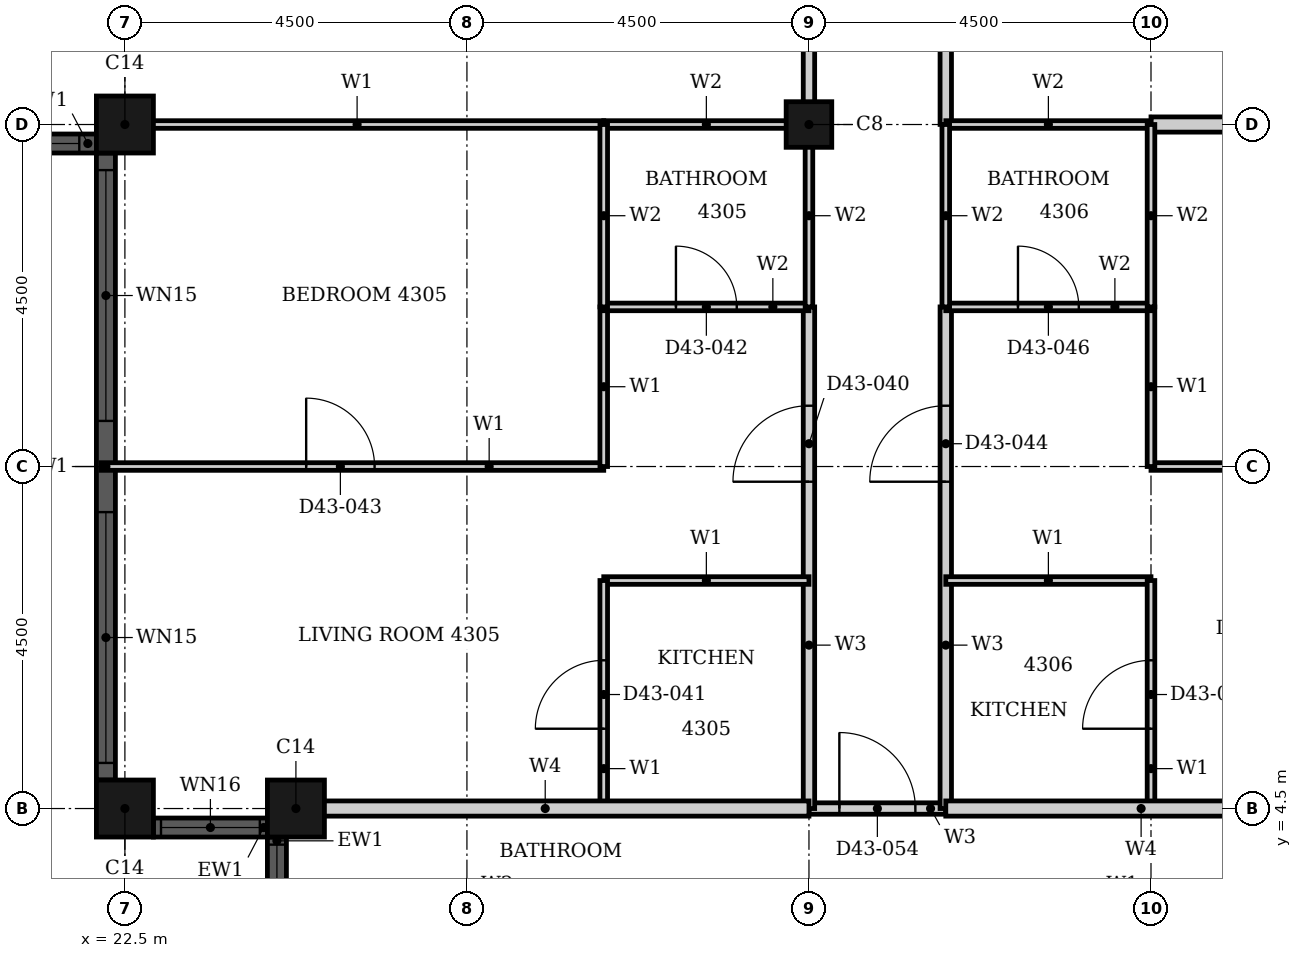
"""IFC4 building model, lengths in metres.
Left out: names, types, materials, properties, quantities, classifications, styles, units other than length and angle.
Written with IfcOpenShell. Run it as: python <this file> out.ifc"""

import sys

from ifc_helpers import new_model, si_unit, direction, frame, frame_2d, origin, origin_2d, place, context, subcontext, project, spatial, rectangle, hollow_rectangle, extrude, element, fill, save


model = new_model("IFC4")
c1 = context("Model", 3, precision=1e-05, world=origin(), true_north=direction((0.0, 1.0)))
c2 = subcontext(c1, "Body", "Model", "MODEL_VIEW")
j1 = project(units=[si_unit("LENGTHUNIT", "METRE"), si_unit("PLANEANGLEUNIT", "RADIAN")], contexts=[c1])
p1 = place(None, origin())
s1 = spatial("IfcSite", under=j1, at=p1, CompositionType="ELEMENT")
p2 = place(p1, origin())
s2 = spatial("IfcBuilding", under=s1, at=p2, CompositionType="ELEMENT")
p3 = place(p2, frame((0.0, 0.0, 172.8)))
s3 = spatial("IfcBuildingStorey", under=s2, at=p3, CompositionType="ELEMENT", Elevation=172.8)
for number, where, z_axis, x_axis in (
    (1, (22.5, 4.5, 0.0), (0.0, 0.0, 1.0), (1.0, 0.0, 0.0)),
    (2, (24.75, 4.5, 0.0), (0.0, 0.0, 1.0), (1.0, 0.0, 0.0)),
    (3, (22.5, 13.5, 0.0), (0.0, 0.0, 1.0), (1.0, 0.0, 0.0)),
):
    element("IfcColumn", number, at=place(p3, frame(where, z_axis=z_axis, x_axis=x_axis)), inside=s3, PredefinedType="COLUMN", context=c2, shape_type="SweptSolid", body=[
        extrude(hollow_rectangle(XDim=0.75, YDim=0.75, WallThickness=0.024, at=origin_2d()), origin(), (0.0, 0.0, 1.0), 3.7),
    ])
p4 = place(p3, frame((31.5, 13.5, 0.0), z_axis=(0.0, 0.0, 1.0), x_axis=(1.0, 0.0, 0.0)))
e4 = element("IfcColumn", 4, at=p4, inside=s3, PredefinedType="COLUMN", context=c2, shape_type="SweptSolid", body=[
    extrude(hollow_rectangle(XDim=0.6, YDim=0.6, WallThickness=0.02, at=origin_2d()), origin(), (0.0, 0.0, 1.0), 3.7),
])
p5 = place(p3, frame((22.875, 4.25, 0.0), z_axis=(0.0, 0.0, 1.0), x_axis=(1.0, 0.0, 0.0)))
e5 = element("IfcWall", 5, at=p5, inside=s3, PredefinedType="SOLIDWALL", context=c2, shape_type="SweptSolid", body=[
    extrude(rectangle(XDim=1.5, YDim=0.25, at=frame_2d((0.75, 0.0))), origin(), (0.0, 0.0, 1.0), 3.7),
])
p6 = place(p5, frame((0.1, 0.0, 0.9)))
e6 = element("IfcOpeningElement", 6, at=p6, cuts=e5, PredefinedType="OPENING", context=c2, shape_type="SweptSolid", body=[
    extrude(rectangle(XDim=1.3, YDim=1.85, at=frame_2d((0.65, 0.925))), frame((0.0, 0.135, 0.0), z_axis=(0.0, -1.0, 0.0), x_axis=(1.0, 0.0, 0.0)), (0.0, 0.0, 1.0), 0.27),
])
p7 = place(p3, frame((24.5, 4.125, 0.0), z_axis=(0.0, 0.0, 1.0), x_axis=(0.0, -1.0, 0.0)))
e7 = element("IfcWall", 7, at=p7, inside=s3, PredefinedType="SOLIDWALL", context=c2, shape_type="SweptSolid", body=[
    extrude(rectangle(XDim=1.5, YDim=0.25, at=frame_2d((0.75, 0.0))), origin(), (0.0, 0.0, 1.0), 3.7),
])
p8 = place(p7, frame((0.1, 0.0, 0.9)))
e8 = element("IfcOpeningElement", 8, at=p8, cuts=e7, PredefinedType="OPENING", context=c2, shape_type="SweptSolid", body=[
    extrude(rectangle(XDim=1.3, YDim=1.85, at=frame_2d((0.65, 0.925))), frame((0.0, 0.135, 0.0), z_axis=(0.0, -1.0, 0.0), x_axis=(1.0, 0.0, 0.0)), (0.0, 0.0, 1.0), 0.27),
])
p9 = place(p3, frame((18.375, 13.25, 0.0), z_axis=(0.0, 0.0, 1.0), x_axis=(1.0, 0.0, 0.0)))
e9 = element("IfcWall", 9, at=p9, inside=s3, PredefinedType="SOLIDWALL", context=c2, shape_type="SweptSolid", body=[
    extrude(rectangle(XDim=3.75, YDim=0.25, at=frame_2d((1.875, 0.0))), origin(), (0.0, 0.0, 1.0), 3.7),
])
p10 = place(p9, frame((0.225, 0.0, 0.45)))
e10 = element("IfcOpeningElement", 10, at=p10, cuts=e9, PredefinedType="OPENING", context=c2, shape_type="SweptSolid", body=[
    extrude(rectangle(XDim=3.3, YDim=2.3, at=frame_2d((1.65, 1.15))), frame((0.0, 0.135, 0.0), z_axis=(0.0, -1.0, 0.0), x_axis=(1.0, 0.0, 0.0)), (0.0, 0.0, 1.0), 0.27),
])
p11 = place(p3, frame((22.25, 13.125, 0.0), z_axis=(0.0, 0.0, 1.0), x_axis=(0.0, -1.0, 0.0)))
e11 = element("IfcWall", 11, at=p11, inside=s3, PredefinedType="SOLIDWALL", context=c2, shape_type="SweptSolid", body=[
    extrude(rectangle(XDim=8.25, YDim=0.25, at=frame_2d((4.125, 0.0))), origin(), (0.0, 0.0, 1.0), 3.7),
])
p12 = place(p11, frame((0.225, 0.0, 0.45)))
e12 = element("IfcOpeningElement", 12, at=p12, cuts=e11, PredefinedType="OPENING", context=c2, shape_type="SweptSolid", body=[
    extrude(rectangle(XDim=3.3, YDim=2.3, at=frame_2d((1.65, 1.15))), frame((0.0, 0.135, 0.0), z_axis=(0.0, -1.0, 0.0), x_axis=(1.0, 0.0, 0.0)), (0.0, 0.0, 1.0), 0.27),
])
p13 = place(p11, frame((4.725, 0.0, 0.45)))
e13 = element("IfcOpeningElement", 13, at=p13, cuts=e11, PredefinedType="OPENING", context=c2, shape_type="SweptSolid", body=[
    extrude(rectangle(XDim=3.3, YDim=2.3, at=frame_2d((1.65, 1.15))), frame((0.0, 0.135, 0.0), z_axis=(0.0, -1.0, 0.0), x_axis=(1.0, 0.0, 0.0)), (0.0, 0.0, 1.0), 0.27),
])
p14 = place(p3, frame((31.5, 4.5, 0.0), z_axis=(0.0, 0.0, 1.0), x_axis=(1.0, 0.0, 0.0)))
e14 = element("IfcWall", 14, at=p14, inside=s3, PredefinedType="PARTITIONING", context=c2, shape_type="SweptSolid", body=[
    extrude(rectangle(XDim=1.8, YDim=0.15, at=frame_2d((0.9, 0.0))), origin(), (0.0, 0.0, 1.0), 3.4),
])
p15 = place(p14, frame((0.4, 0.0, 0.0)))
e15 = element("IfcOpeningElement", 15, at=p15, cuts=e14, PredefinedType="OPENING", context=c2, shape_type="SweptSolid", body=[
    extrude(rectangle(XDim=1.0, YDim=2.2, at=frame_2d((0.5, 1.1))), frame((0.0, 0.085, 0.0), z_axis=(0.0, -1.0, 0.0), x_axis=(1.0, 0.0, 0.0)), (0.0, 0.0, 1.0), 0.17),
])
p16 = place(p3, frame((31.5, 4.5, 0.0), z_axis=(0.0, 0.0, 1.0), x_axis=(0.0, 1.0, 0.0)))
e16 = element("IfcWall", 16, at=p16, inside=s3, PredefinedType="PARTITIONING", context=c2, shape_type="SweptSolid", body=[
    extrude(rectangle(XDim=6.6, YDim=0.15, at=frame_2d((3.3, 0.0))), origin(), (0.0, 0.0, 1.0), 2.68),
])
p17 = place(p16, frame((4.3, 0.0, 0.0)))
e17 = element("IfcOpeningElement", 17, at=p17, cuts=e16, PredefinedType="OPENING", context=c2, shape_type="SweptSolid", body=[
    extrude(rectangle(XDim=1.0, YDim=2.2, at=frame_2d((0.5, 1.1))), frame((0.0, 0.085, 0.0), z_axis=(0.0, -1.0, 0.0), x_axis=(1.0, 0.0, 0.0)), (0.0, 0.0, 1.0), 0.17),
])
p18 = place(p3, frame((31.5, 13.5, 0.0), z_axis=(0.0, 0.0, 1.0), x_axis=(0.0, 1.0, 0.0)))
e18 = element("IfcWall", 18, at=p18, inside=s3, PredefinedType="PARTITIONING", context=c2, shape_type="SweptSolid", body=[
    extrude(rectangle(XDim=7.2, YDim=0.15, at=frame_2d((3.6, 0.0))), origin(), (0.0, 0.0, 1.0), 3.4),
])
p19 = place(p3, frame((33.3, 4.5, 0.0), z_axis=(0.0, 0.0, 1.0), x_axis=(0.0, 1.0, 0.0)))
e19 = element("IfcWall", 19, at=p19, inside=s3, PredefinedType="PARTITIONING", context=c2, shape_type="SweptSolid", body=[
    extrude(rectangle(XDim=6.6, YDim=0.15, at=frame_2d((3.3, 0.0))), origin(), (0.0, 0.0, 1.0), 3.4),
])
p20 = place(p19, frame((4.3, 0.0, 0.0)))
e20 = element("IfcOpeningElement", 20, at=p20, cuts=e19, PredefinedType="OPENING", context=c2, shape_type="SweptSolid", body=[
    extrude(rectangle(XDim=1.0, YDim=2.2, at=frame_2d((0.5, 1.1))), frame((0.0, 0.085, 0.0), z_axis=(0.0, -1.0, 0.0), x_axis=(1.0, 0.0, 0.0)), (0.0, 0.0, 1.0), 0.17),
])
p21 = place(p3, frame((33.3, 13.501, 0.0), z_axis=(0.0, 0.0, 1.0), x_axis=(0.0, 1.0, 0.0)))
e21 = element("IfcWall", 21, at=p21, inside=s3, PredefinedType="PARTITIONING", context=c2, shape_type="SweptSolid", body=[
    extrude(rectangle(XDim=7.198, YDim=0.15, at=frame_2d((3.599, 0.0))), origin(), (0.0, 0.0, 1.0), 3.4),
])
p22 = place(p21, frame((3.099, 0.0, 0.0)))
e22 = element("IfcOpeningElement", 22, at=p22, cuts=e21, PredefinedType="OPENING", context=c2, shape_type="SweptSolid", body=[
    extrude(rectangle(XDim=1.0, YDim=2.2, at=frame_2d((0.5, 1.1))), frame((0.0, 0.085, 0.0), z_axis=(0.0, -1.0, 0.0), x_axis=(1.0, 0.0, 0.0)), (0.0, 0.0, 1.0), 0.17),
])
p23 = place(p3, frame((22.31, 13.5, 0.0), z_axis=(0.0, 0.0, 1.0), x_axis=(1.0, 0.0, 0.0)))
e23 = element("IfcWall", 23, at=p23, inside=s3, PredefinedType="PARTITIONING", context=c2, shape_type="SweptSolid", body=[
    extrude(rectangle(XDim=6.49, YDim=0.1, at=frame_2d((3.245, 0.0))), origin(), (0.0, 0.0, 1.0), 2.48),
])
for number, where, z_axis, x_axis in (
    (24, (33.3, 7.5, 0.0), (0.0, 0.0, 1.0), (1.0, 0.0, 0.0)),
    (25, (28.8, 7.5, 0.0), (0.0, 0.0, 1.0), (1.0, 0.0, 0.0)),
):
    element("IfcWall", number, at=place(p3, frame(where, z_axis=z_axis, x_axis=x_axis)), inside=s3, PredefinedType="PARTITIONING", context=c2, shape_type="SweptSolid", body=[
        extrude(rectangle(XDim=2.7, YDim=0.1, at=frame_2d((1.35, 0.0))), origin(), (0.0, 0.0, 1.0), 3.4),
    ])
p24 = place(p3, frame((36.0, 9.0, 0.0), z_axis=(0.0, 0.0, 1.0), x_axis=(1.0, 0.0, 0.0)))
e26 = element("IfcWall", 26, at=p24, inside=s3, PredefinedType="PARTITIONING", context=c2, shape_type="SweptSolid", body=[
    extrude(rectangle(XDim=4.815, YDim=0.1, at=frame_2d((2.407, 0.0))), origin(), (0.0, 0.0, 1.0), 3.4),
])
p25 = place(p24, frame((1.8, 0.0, 0.0)))
e27 = element("IfcOpeningElement", 27, at=p25, cuts=e26, PredefinedType="OPENING", context=c2, shape_type="SweptSolid", body=[
    extrude(rectangle(XDim=0.9, YDim=2.1, at=frame_2d((0.45, 1.05))), frame((0.0, 0.06, 0.0), z_axis=(0.0, -1.0, 0.0), x_axis=(1.0, 0.0, 0.0)), (0.0, 0.0, 1.0), 0.12),
])
p26 = place(p3, frame((22.185, 9.0, 0.0), z_axis=(0.0, 0.0, 1.0), x_axis=(1.0, 0.0, 0.0)))
e28 = element("IfcWall", 28, at=p26, inside=s3, PredefinedType="PARTITIONING", context=c2, shape_type="SweptSolid", body=[
    extrude(rectangle(XDim=6.615, YDim=0.1, at=frame_2d((3.308, 0.0))), origin(), (0.0, 0.0, 1.0), 3.4),
])
p27 = place(p26, frame((2.7, 0.0, 0.0)))
e29 = element("IfcOpeningElement", 29, at=p27, cuts=e28, PredefinedType="OPENING", context=c2, shape_type="SweptSolid", body=[
    extrude(rectangle(XDim=0.9, YDim=2.1, at=frame_2d((0.45, 1.05))), frame((0.0, 0.06, 0.0), z_axis=(0.0, -1.0, 0.0), x_axis=(1.0, 0.0, 0.0)), (0.0, 0.0, 1.0), 0.12),
])
p28 = place(p3, frame((28.8, 9.0, 0.0), z_axis=(0.0, 0.0, 1.0), x_axis=(0.0, 1.0, 0.0)))
e30 = element("IfcWall", 30, at=p28, inside=s3, PredefinedType="PARTITIONING", context=c2, shape_type="SweptSolid", body=[
    extrude(rectangle(XDim=2.1, YDim=0.1, at=frame_2d((1.05, 0.0))), origin(), (0.0, 0.0, 1.0), 3.4),
])
p29 = place(p3, frame((28.8, 4.5, 0.0), z_axis=(0.0, 0.0, 1.0), x_axis=(0.0, 1.0, 0.0)))
e31 = element("IfcWall", 31, at=p29, inside=s3, PredefinedType="PARTITIONING", context=c2, shape_type="SweptSolid", body=[
    extrude(rectangle(XDim=3.0, YDim=0.1, at=frame_2d((1.5, 0.0))), origin(), (0.0, 0.0, 1.0), 3.4),
])
p30 = place(p29, frame((1.05, 0.0, 0.0)))
e32 = element("IfcOpeningElement", 32, at=p30, cuts=e31, PredefinedType="OPENING", context=c2, shape_type="SweptSolid", body=[
    extrude(rectangle(XDim=0.9, YDim=2.1, at=frame_2d((0.45, 1.05))), frame((0.0, 0.06, 0.0), z_axis=(0.0, -1.0, 0.0), x_axis=(1.0, 0.0, 0.0)), (0.0, 0.0, 1.0), 0.12),
])
p31 = place(p3, frame((36.0, 9.0, 0.0), z_axis=(0.0, 0.0, 1.0), x_axis=(0.0, 1.0, 0.0)))
e33 = element("IfcWall", 33, at=p31, inside=s3, PredefinedType="PARTITIONING", context=c2, shape_type="SweptSolid", body=[
    extrude(rectangle(XDim=2.1, YDim=0.1, at=frame_2d((1.05, 0.0))), origin(), (0.0, 0.0, 1.0), 2.68),
])
p32 = place(p3, frame((36.0, 4.5, 0.0), z_axis=(0.0, 0.0, 1.0), x_axis=(0.0, 1.0, 0.0)))
e34 = element("IfcWall", 34, at=p32, inside=s3, PredefinedType="PARTITIONING", context=c2, shape_type="SweptSolid", body=[
    extrude(rectangle(XDim=3.0, YDim=0.1, at=frame_2d((1.5, 0.0))), origin(), (0.0, 0.0, 1.0), 2.68),
])
p33 = place(p32, frame((1.05, 0.0, 0.0)))
e35 = element("IfcOpeningElement", 35, at=p33, cuts=e34, PredefinedType="OPENING", context=c2, shape_type="SweptSolid", body=[
    extrude(rectangle(XDim=0.9, YDim=2.1, at=frame_2d((0.45, 1.05))), frame((0.0, 0.06, 0.0), z_axis=(0.0, -1.0, 0.0), x_axis=(1.0, 0.0, 0.0)), (0.0, 0.0, 1.0), 0.12),
])
p34 = place(p3, frame((36.0, 13.5, 0.0), z_axis=(0.0, 0.0, 1.0), x_axis=(1.0, 0.0, 0.0)))
e36 = element("IfcWall", 36, at=p34, inside=s3, PredefinedType="PARTITIONING", context=c2, shape_type="SweptSolid", body=[
    extrude(rectangle(XDim=4.69, YDim=0.2, at=frame_2d((2.345, 0.0))), origin(), (0.0, 0.0, 1.0), 2.48),
])
p35 = place(p3, frame((33.3, 4.5, 0.0), z_axis=(0.0, 0.0, 1.0), x_axis=(1.0, 0.0, 0.0)))
e37 = element("IfcWall", 37, at=p35, inside=s3, PredefinedType="PARTITIONING", context=c2, shape_type="SweptSolid", body=[
    extrude(rectangle(XDim=5.14, YDim=0.2, at=frame_2d((2.57, 0.0))), origin(), (0.0, 0.0, 1.0), 3.4),
])
p36 = place(p3, frame((24.56, 4.5, 0.0), z_axis=(0.0, 0.0, 1.0), x_axis=(1.0, 0.0, 0.0)))
e38 = element("IfcWall", 38, at=p36, inside=s3, PredefinedType="PARTITIONING", context=c2, shape_type="SweptSolid", body=[
    extrude(rectangle(XDim=6.94, YDim=0.2, at=frame_2d((3.47, 0.0))), origin(), (0.0, 0.0, 1.0), 3.4),
])
p37 = place(p3, frame((33.3, 11.1, 0.0), z_axis=(0.0, 0.0, 1.0), x_axis=(1.0, 0.0, 0.0)))
e39 = element("IfcWall", 39, at=p37, inside=s3, PredefinedType="PARTITIONING", context=c2, shape_type="SweptSolid", body=[
    extrude(rectangle(XDim=2.7, YDim=0.1, at=frame_2d((1.35, 0.0))), origin(), (0.0, 0.0, 1.0), 3.4),
])
p38 = place(p37, frame((0.95, 0.0, 0.0)))
e40 = element("IfcOpeningElement", 40, at=p38, cuts=e39, PredefinedType="OPENING", context=c2, shape_type="SweptSolid", body=[
    extrude(rectangle(XDim=0.8, YDim=2.1, at=frame_2d((0.4, 1.05))), frame((0.0, 0.06, 0.0), z_axis=(0.0, -1.0, 0.0), x_axis=(1.0, 0.0, 0.0)), (0.0, 0.0, 1.0), 0.12),
])
p39 = place(p3, frame((28.8, 11.1, 0.0), z_axis=(0.0, 0.0, 1.0), x_axis=(1.0, 0.0, 0.0)))
e41 = element("IfcWall", 41, at=p39, inside=s3, PredefinedType="PARTITIONING", context=c2, shape_type="SweptSolid", body=[
    extrude(rectangle(XDim=2.7, YDim=0.1, at=frame_2d((1.35, 0.0))), origin(), (0.0, 0.0, 1.0), 3.4),
])
p40 = place(p39, frame((0.95, 0.0, 0.0)))
e42 = element("IfcOpeningElement", 42, at=p40, cuts=e41, PredefinedType="OPENING", context=c2, shape_type="SweptSolid", body=[
    extrude(rectangle(XDim=0.8, YDim=2.1, at=frame_2d((0.4, 1.05))), frame((0.0, 0.06, 0.0), z_axis=(0.0, -1.0, 0.0), x_axis=(1.0, 0.0, 0.0)), (0.0, 0.0, 1.0), 0.12),
])
p41 = place(p3, frame((33.301, 13.5, 0.0), z_axis=(0.0, 0.0, 1.0), x_axis=(1.0, 0.0, 0.0)))
e43 = element("IfcWall", 43, at=p41, inside=s3, PredefinedType="PARTITIONING", context=c2, shape_type="SweptSolid", body=[
    extrude(rectangle(XDim=2.698, YDim=0.1, at=frame_2d((1.349, 0.0))), origin(), (0.0, 0.0, 1.0), 2.48),
])
p42 = place(p3, frame((28.8, 13.5, 0.0), z_axis=(0.0, 0.0, 1.0), x_axis=(1.0, 0.0, 0.0)))
e44 = element("IfcWall", 44, at=p42, inside=s3, PredefinedType="PARTITIONING", context=c2, shape_type="SweptSolid", body=[
    extrude(rectangle(XDim=2.7, YDim=0.1, at=frame_2d((1.35, 0.0))), origin(), (0.0, 0.0, 1.0), 2.48),
])
p43 = place(p3, frame((28.8, 11.1, 0.0), z_axis=(0.0, 0.0, 1.0), x_axis=(0.0, 1.0, 0.0)))
e45 = element("IfcWall", 45, at=p43, inside=s3, PredefinedType="PARTITIONING", context=c2, shape_type="SweptSolid", body=[
    extrude(rectangle(XDim=2.4, YDim=0.1, at=frame_2d((1.2, 0.0))), origin(), (0.0, 0.0, 1.0), 3.4),
])
p44 = place(p3, frame((31.5, 11.1, 0.0), z_axis=(0.0, 0.0, 1.0), x_axis=(0.0, 1.0, 0.0)))
e46 = element("IfcWall", 46, at=p44, inside=s3, PredefinedType="PARTITIONING", context=c2, shape_type="SweptSolid", body=[
    extrude(rectangle(XDim=2.4, YDim=0.1, at=frame_2d((1.2, 0.0))), origin(), (0.0, 0.0, 1.0), 2.68),
])
p45 = place(p3, frame((33.3, 11.1, 0.0), z_axis=(0.0, 0.0, 1.0), x_axis=(0.0, 1.0, 0.0)))
e47 = element("IfcWall", 47, at=p45, inside=s3, PredefinedType="PARTITIONING", context=c2, shape_type="SweptSolid", body=[
    extrude(rectangle(XDim=2.4, YDim=0.1, at=frame_2d((1.2, 0.0))), origin(), (0.0, 0.0, 1.0), 3.4),
])
p46 = place(p3, frame((36.0, 11.1, 0.0), z_axis=(0.0, 0.0, 1.0), x_axis=(0.0, 1.0, 0.0)))
e48 = element("IfcWall", 48, at=p46, inside=s3, PredefinedType="PARTITIONING", context=c2, shape_type="SweptSolid", body=[
    extrude(rectangle(XDim=2.4, YDim=0.1, at=frame_2d((1.2, 0.0))), origin(), (0.0, 0.0, 1.0), 2.68),
])
p47 = place(p6, origin())
e49 = element("IfcWindow", 49, at=p47, inside=s3, PartitioningType="SINGLE_PANEL", PredefinedType="WINDOW", context=c2, shape_type="SweptSolid", body=[
    extrude(rectangle(XDim=1.3, YDim=1.85, at=frame_2d((0.65, 0.925))), frame((0.0, 0.03, 0.0), z_axis=(0.0, -1.0, 0.0), x_axis=(1.0, 0.0, 0.0)), (0.0, 0.0, 1.0), 0.06),
])
fill(e6, e49)
p48 = place(p8, origin())
e50 = element("IfcWindow", 50, at=p48, inside=s3, PartitioningType="SINGLE_PANEL", PredefinedType="WINDOW", context=c2, shape_type="SweptSolid", body=[
    extrude(rectangle(XDim=1.3, YDim=1.85, at=frame_2d((0.65, 0.925))), frame((0.0, 0.03, 0.0), z_axis=(0.0, -1.0, 0.0), x_axis=(1.0, 0.0, 0.0)), (0.0, 0.0, 1.0), 0.06),
])
fill(e8, e50)
p49 = place(p10, origin())
e51 = element("IfcWindow", 51, at=p49, inside=s3, PartitioningType="SINGLE_PANEL", PredefinedType="WINDOW", context=c2, shape_type="SweptSolid", body=[
    extrude(rectangle(XDim=3.3, YDim=2.3, at=frame_2d((1.65, 1.15))), frame((0.0, 0.03, 0.0), z_axis=(0.0, -1.0, 0.0), x_axis=(1.0, 0.0, 0.0)), (0.0, 0.0, 1.0), 0.06),
])
fill(e10, e51)
p50 = place(p12, origin())
e52 = element("IfcWindow", 52, at=p50, inside=s3, PartitioningType="SINGLE_PANEL", PredefinedType="WINDOW", context=c2, shape_type="SweptSolid", body=[
    extrude(rectangle(XDim=3.3, YDim=2.3, at=frame_2d((1.65, 1.15))), frame((0.0, 0.03, 0.0), z_axis=(0.0, -1.0, 0.0), x_axis=(1.0, 0.0, 0.0)), (0.0, 0.0, 1.0), 0.06),
])
fill(e12, e52)
p51 = place(p13, origin())
e53 = element("IfcWindow", 53, at=p51, inside=s3, PartitioningType="SINGLE_PANEL", PredefinedType="WINDOW", context=c2, shape_type="SweptSolid", body=[
    extrude(rectangle(XDim=3.3, YDim=2.3, at=frame_2d((1.65, 1.15))), frame((0.0, 0.03, 0.0), z_axis=(0.0, -1.0, 0.0), x_axis=(1.0, 0.0, 0.0)), (0.0, 0.0, 1.0), 0.06),
])
fill(e13, e53)
p52 = place(p17, origin())
e54 = element("IfcDoor", 54, at=p52, inside=s3, OperationType="SINGLE_SWING_RIGHT", PredefinedType="DOOR", context=c2, shape_type="SweptSolid", body=[
    extrude(rectangle(XDim=1.0, YDim=2.2, at=frame_2d((0.5, 1.1))), frame((0.0, 0.025, 0.0), z_axis=(0.0, -1.0, 0.0), x_axis=(1.0, 0.0, 0.0)), (0.0, 0.0, 1.0), 0.05),
])
fill(e17, e54)
p53 = place(p30, origin())
e55 = element("IfcDoor", 55, at=p53, inside=s3, OperationType="SINGLE_SWING_RIGHT", PredefinedType="DOOR", context=c2, shape_type="SweptSolid", body=[
    extrude(rectangle(XDim=0.9, YDim=2.1, at=frame_2d((0.45, 1.05))), frame((0.0, 0.025, 0.0), z_axis=(0.0, -1.0, 0.0), x_axis=(1.0, 0.0, 0.0)), (0.0, 0.0, 1.0), 0.05),
])
fill(e32, e55)
p54 = place(p40, origin())
e56 = element("IfcDoor", 56, at=p54, inside=s3, OperationType="SINGLE_SWING_LEFT", PredefinedType="DOOR", context=c2, shape_type="SweptSolid", body=[
    extrude(rectangle(XDim=0.8, YDim=2.1, at=frame_2d((0.4, 1.05))), frame((0.0, 0.025, 0.0), z_axis=(0.0, -1.0, 0.0), x_axis=(1.0, 0.0, 0.0)), (0.0, 0.0, 1.0), 0.05),
])
fill(e42, e56)
p55 = place(p27, origin())
e57 = element("IfcDoor", 57, at=p55, inside=s3, OperationType="SINGLE_SWING_RIGHT", PredefinedType="DOOR", context=c2, shape_type="SweptSolid", body=[
    extrude(rectangle(XDim=0.9, YDim=2.1, at=frame_2d((0.45, 1.05))), frame((0.0, 0.025, 0.0), z_axis=(0.0, -1.0, 0.0), x_axis=(1.0, 0.0, 0.0)), (0.0, 0.0, 1.0), 0.05),
])
fill(e29, e57)
p56 = place(p20, origin())
e58 = element("IfcDoor", 58, at=p56, inside=s3, OperationType="SINGLE_SWING_LEFT", PredefinedType="DOOR", context=c2, shape_type="SweptSolid", body=[
    extrude(rectangle(XDim=1.0, YDim=2.2, at=frame_2d((0.5, 1.1))), frame((0.0, 0.025, 0.0), z_axis=(0.0, -1.0, 0.0), x_axis=(1.0, 0.0, 0.0)), (0.0, 0.0, 1.0), 0.05),
])
fill(e20, e58)
p57 = place(p33, origin())
e59 = element("IfcDoor", 59, at=p57, inside=s3, OperationType="SINGLE_SWING_RIGHT", PredefinedType="DOOR", context=c2, shape_type="SweptSolid", body=[
    extrude(rectangle(XDim=0.9, YDim=2.1, at=frame_2d((0.45, 1.05))), frame((0.0, 0.025, 0.0), z_axis=(0.0, -1.0, 0.0), x_axis=(1.0, 0.0, 0.0)), (0.0, 0.0, 1.0), 0.05),
])
fill(e35, e59)
p58 = place(p38, origin())
e60 = element("IfcDoor", 60, at=p58, inside=s3, OperationType="SINGLE_SWING_LEFT", PredefinedType="DOOR", context=c2, shape_type="SweptSolid", body=[
    extrude(rectangle(XDim=0.8, YDim=2.1, at=frame_2d((0.4, 1.05))), frame((0.0, 0.025, 0.0), z_axis=(0.0, -1.0, 0.0), x_axis=(1.0, 0.0, 0.0)), (0.0, 0.0, 1.0), 0.05),
])
fill(e40, e60)
p59 = place(p15, origin())
e61 = element("IfcDoor", 61, at=p59, inside=s3, OperationType="SINGLE_SWING_LEFT", PredefinedType="DOOR", context=c2, shape_type="SweptSolid", body=[
    extrude(rectangle(XDim=1.0, YDim=2.2, at=frame_2d((0.5, 1.1))), frame((0.0, 0.025, 0.0), z_axis=(0.0, -1.0, 0.0), x_axis=(1.0, 0.0, 0.0)), (0.0, 0.0, 1.0), 0.05),
])
fill(e15, e61)
save(model, sys.argv[1])
